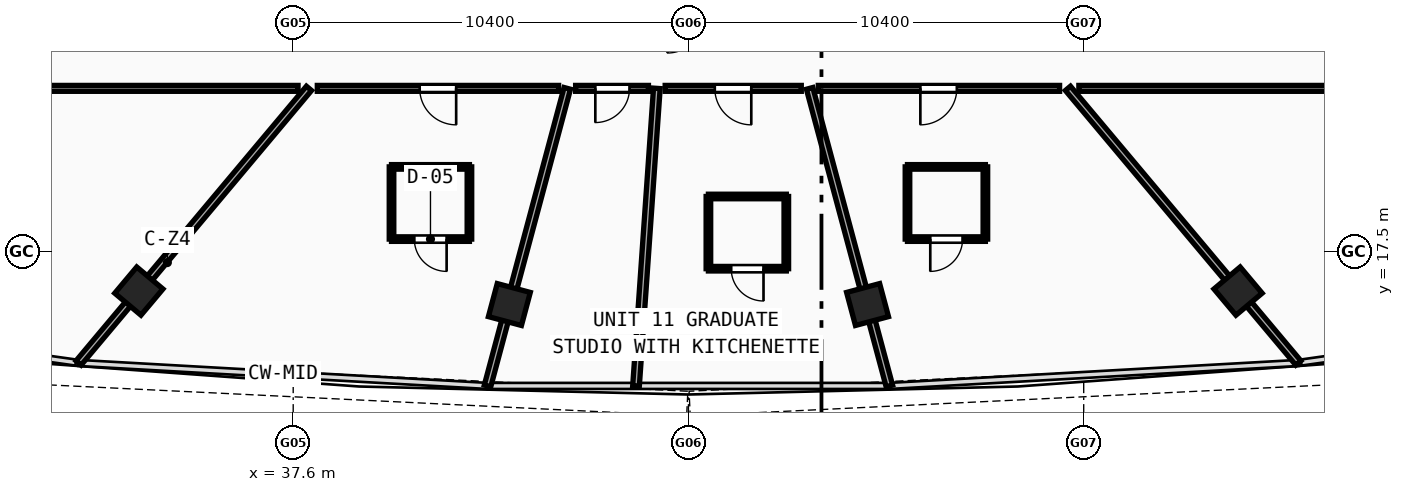
"""IFC4 building model, lengths in metres.
Left out: names, types, materials, properties, quantities, classifications, styles, units other than length and angle.
Written with IfcOpenShell. Run it as: python <this file> out.ifc"""

import sys

from ifc_helpers import new_model, si_unit, direction, frame, frame_2d, origin, origin_with_axes, origin_2d, place, context, subcontext, project, spatial, rectangle, hollow_rectangle, extrude, source, transform, mapped, element, fill, save


model = new_model("IFC4")
c1 = context("Model", 3, precision=1e-05, world=origin(), true_north=direction((0.0, 1.0)))
c2 = subcontext(c1, "Body", "Model", "MODEL_VIEW")
j1 = project(units=[si_unit("LENGTHUNIT", "METRE"), si_unit("PLANEANGLEUNIT", "RADIAN")], contexts=[c1])
p1 = place(None, origin())
s1 = spatial("IfcSite", under=j1, at=p1, CompositionType="ELEMENT")
p2 = place(p1, origin())
s2 = spatial("IfcBuilding", under=s1, at=p2, CompositionType="ELEMENT")
p3 = place(p2, frame((0.0, 0.0, 180.96)))
s3 = spatial("IfcBuildingStorey", under=s2, at=p3, CompositionType="ELEMENT", Elevation=180.96)
m1 = source(origin(), c2, "Body", "SweptSolid", [
    extrude(hollow_rectangle(XDim=0.9, YDim=0.9, WallThickness=0.036, at=origin_2d()), origin(), (0.0, 0.0, 1.0), 3.8),
])
for number, where, z_axis, x_axis in (
    (1, (33.539, 16.466, -0.26), (0.0, 0.0, 1.0), (0.766, -0.643, 0.0)),
    (2, (43.288, 16.112, -0.26), (0.0, 0.0, 1.0), (0.966, -0.259, 0.0)),
    (3, (52.713, 16.112, -0.26), (0.0, 0.0, 1.0), (0.966, 0.259, 0.0)),
    (4, (62.461, 16.466, -0.26), (0.0, 0.0, 1.0), (0.766, 0.643, 0.0)),
):
    element("IfcColumn", number, at=place(p3, frame(where, z_axis=z_axis, x_axis=x_axis)), inside=s3, PredefinedType="COLUMN", context=c2, shape_type="MappedRepresentation", body=[
        mapped(m1, transform((0.0, 0.0, 0.0), scale=1.0)),
    ])
p4 = place(p3, frame((38.015, 21.8, 0.0), z_axis=(0.0, 0.0, 1.0), x_axis=(-0.642777943688, -0.766052553751, 0.0)))
e5 = element("IfcWall", 5, at=p4, inside=s3, PredefinedType="PARTITIONING", context=c2, shape_type="SweptSolid", body=[
    extrude(rectangle(XDim=9.431, YDim=0.175, at=frame_2d((4.715, 0.0))), origin(), (0.0, 0.0, 1.0), 2.89),
])
p5 = place(p3, frame((44.811, 21.8, 0.0), z_axis=(0.0, 0.0, 1.0), x_axis=(-0.258815374981, -0.965926809688, 0.0)))
e6 = element("IfcWall", 6, at=p5, inside=s3, PredefinedType="PARTITIONING", context=c2, shape_type="SweptSolid", body=[
    extrude(rectangle(XDim=8.106, YDim=0.175, at=frame_2d((4.053, 0.0))), origin(), (0.0, 0.0, 1.0), 2.89),
])
p6 = place(p3, frame((47.168, 21.8, 0.0), z_axis=(0.0, 0.0, 1.0), x_axis=(-0.069770314737, -0.997563082307, 0.0)))
e7 = element("IfcWall", 7, at=p6, inside=s3, PredefinedType="PARTITIONING", context=c2, shape_type="SweptSolid", body=[
    extrude(rectangle(XDim=7.849, YDim=0.175, at=frame_2d((3.924, 0.0))), origin(), (0.0, 0.0, 1.0), 2.89),
])
p7 = place(p3, frame((51.189, 21.8, 0.0), z_axis=(0.0, 0.0, 1.0), x_axis=(0.258815374981, -0.965926809688, 0.0)))
e8 = element("IfcWall", 8, at=p7, inside=s3, PredefinedType="PARTITIONING", context=c2, shape_type="SweptSolid", body=[
    extrude(rectangle(XDim=8.106, YDim=0.175, at=frame_2d((4.053, 0.0))), origin(), (0.0, 0.0, 1.0), 2.89),
])
p8 = place(p3, frame((57.985, 21.8, 0.0), z_axis=(0.0, 0.0, 1.0), x_axis=(0.642777943688, -0.766052553751, 0.0)))
e9 = element("IfcWall", 9, at=p8, inside=s3, PredefinedType="PARTITIONING", context=c2, shape_type="SweptSolid", body=[
    extrude(rectangle(XDim=9.431, YDim=0.175, at=frame_2d((4.715, 0.0))), origin(), (0.0, 0.0, 1.0), 2.89),
])
p9 = place(p3, frame((66.4, 21.8, 0.0), z_axis=(0.0, 0.0, 1.0), x_axis=(-1.0, 0.0, 0.0)))
e10 = element("IfcWall", 10, at=p9, inside=s3, PredefinedType="PARTITIONING", context=c2, shape_type="SweptSolid", body=[
    extrude(rectangle(XDim=8.127, YDim=0.155, at=frame_2d((4.064, 0.0))), origin(), (0.0, 0.0, 1.0), 3.14),
])
p10 = place(p3, frame((57.765, 21.8, 0.0), z_axis=(0.0, 0.0, 1.0), x_axis=(-1.0, 0.0, 0.0)))
e11 = element("IfcWall", 11, at=p10, inside=s3, PredefinedType="PARTITIONING", context=c2, shape_type="SweptSolid", body=[
    extrude(rectangle(XDim=6.349, YDim=0.155, at=frame_2d((3.174, 0.0))), origin(), (0.0, 0.0, 1.0), 2.89),
])
p11 = place(p10, frame((2.703, 0.0, 0.0)))
e12 = element("IfcOpeningElement", 12, at=p11, cuts=e11, PredefinedType="OPENING", context=c2, shape_type="SweptSolid", body=[
    extrude(rectangle(XDim=0.96, YDim=2.12, at=frame_2d((0.48, 1.06))), frame((0.0, 0.087, 0.0), z_axis=(0.0, -1.0, 0.0), x_axis=(1.0, 0.0, 0.0)), (0.0, 0.0, 1.0), 0.175),
])
p12 = place(p3, frame((50.969, 21.8, 0.0), z_axis=(0.0, 0.0, 1.0), x_axis=(-1.0, 0.0, 0.0)))
e13 = element("IfcWall", 13, at=p12, inside=s3, PredefinedType="PARTITIONING", context=c2, shape_type="SweptSolid", body=[
    extrude(rectangle(XDim=3.581, YDim=0.155, at=frame_2d((1.791, 0.0))), origin(), (0.0, 0.0, 1.0), 3.54),
])
p13 = place(p12, frame((1.315, 0.0, 0.0)))
e14 = element("IfcOpeningElement", 14, at=p13, cuts=e13, PredefinedType="OPENING", context=c2, shape_type="SweptSolid", body=[
    extrude(rectangle(XDim=0.96, YDim=2.12, at=frame_2d((0.48, 1.06))), frame((0.0, 0.087, 0.0), z_axis=(0.0, -1.0, 0.0), x_axis=(1.0, 0.0, 0.0)), (0.0, 0.0, 1.0), 0.175),
])
p14 = place(p3, frame((46.948, 21.8, 0.0), z_axis=(0.0, 0.0, 1.0), x_axis=(-1.0, 0.0, 0.0)))
e15 = element("IfcWall", 15, at=p14, inside=s3, PredefinedType="PARTITIONING", context=c2, shape_type="SweptSolid", body=[
    extrude(rectangle(XDim=1.916, YDim=0.155, at=frame_2d((0.958, 0.0))), origin(), (0.0, 0.0, 1.0), 3.54),
])
p15 = place(p14, frame((0.498, 0.0, 0.0)))
e16 = element("IfcOpeningElement", 16, at=p15, cuts=e15, PredefinedType="OPENING", context=c2, shape_type="SweptSolid", body=[
    extrude(rectangle(XDim=0.9, YDim=2.08, at=frame_2d((0.45, 1.04))), frame((0.0, 0.087, 0.0), z_axis=(0.0, -1.0, 0.0), x_axis=(1.0, 0.0, 0.0)), (0.0, 0.0, 1.0), 0.175),
])
p16 = place(p3, frame((44.583, 21.8, 0.0), z_axis=(0.0, 0.0, 1.0), x_axis=(-1.0, 0.0, 0.0)))
e17 = element("IfcWall", 17, at=p16, inside=s3, PredefinedType="PARTITIONING", context=c2, shape_type="SweptSolid", body=[
    extrude(rectangle(XDim=6.349, YDim=0.155, at=frame_2d((3.174, 0.0))), origin(), (0.0, 0.0, 1.0), 2.89),
])
p17 = place(p16, frame((2.696, 0.0, 0.0)))
e18 = element("IfcOpeningElement", 18, at=p17, cuts=e17, PredefinedType="OPENING", context=c2, shape_type="SweptSolid", body=[
    extrude(rectangle(XDim=0.96, YDim=2.12, at=frame_2d((0.48, 1.06))), frame((0.0, 0.087, 0.0), z_axis=(0.0, -1.0, 0.0), x_axis=(1.0, 0.0, 0.0)), (0.0, 0.0, 1.0), 0.175),
])
p18 = place(p3, frame((37.728, 21.8, 0.0), z_axis=(0.0, 0.0, 1.0), x_axis=(-1.0, 0.0, 0.0)))
e19 = element("IfcWall", 19, at=p18, inside=s3, PredefinedType="PARTITIONING", context=c2, shape_type="SweptSolid", body=[
    extrude(rectangle(XDim=8.127, YDim=0.155, at=frame_2d((4.064, 0.0))), origin(), (0.0, 0.0, 1.0), 3.14),
])
p19 = place(p3, frame((40.187, 17.834, 0.0), z_axis=(0.0, 0.0, 1.0), x_axis=(1.0, 0.0, 0.0)))
e20 = element("IfcWall", 20, at=p19, inside=s3, PredefinedType="PARTITIONING", context=c2, shape_type="SweptSolid", body=[
    extrude(rectangle(XDim=2.05, YDim=0.12, at=frame_2d((1.025, 0.0))), origin(), (0.0, 0.0, 1.0), 3.54),
])
p20 = place(p19, frame((0.6, 0.0, 0.0)))
e21 = element("IfcOpeningElement", 21, at=p20, cuts=e20, PredefinedType="OPENING", context=c2, shape_type="SweptSolid", body=[
    extrude(rectangle(XDim=0.85, YDim=2.1, at=frame_2d((0.425, 1.05))), frame((0.0, 0.07, 0.0), z_axis=(0.0, -1.0, 0.0), x_axis=(1.0, 0.0, 0.0)), (0.0, 0.0, 1.0), 0.14),
])
p21 = place(p3, frame((42.237, 17.834, 0.0), z_axis=(0.0, 0.0, 1.0), x_axis=(0.0, 1.0, 0.0)))
e22 = element("IfcWall", 22, at=p21, inside=s3, PredefinedType="PARTITIONING", context=c2, shape_type="SweptSolid", body=[
    extrude(rectangle(XDim=1.9, YDim=0.12, at=frame_2d((0.95, 0.0))), origin(), (0.0, 0.0, 1.0), 3.14),
])
p22 = place(p3, frame((42.237, 19.734, 0.0), z_axis=(0.0, 0.0, 1.0), x_axis=(-1.0, 0.0, 0.0)))
e23 = element("IfcWall", 23, at=p22, inside=s3, PredefinedType="PARTITIONING", context=c2, shape_type="SweptSolid", body=[
    extrude(rectangle(XDim=2.05, YDim=0.12, at=frame_2d((1.025, 0.0))), origin(), (0.0, 0.0, 1.0), 3.14),
])
p23 = place(p3, frame((40.187, 19.734, 0.0), z_axis=(0.0, 0.0, 1.0), x_axis=(0.0, -1.0, 0.0)))
e24 = element("IfcWall", 24, at=p23, inside=s3, PredefinedType="PARTITIONING", context=c2, shape_type="SweptSolid", body=[
    extrude(rectangle(XDim=1.9, YDim=0.12, at=frame_2d((0.95, 0.0))), origin(), (0.0, 0.0, 1.0), 3.14),
])
p24 = place(p3, frame((48.525, 17.055, 0.0), z_axis=(0.0, 0.0, 1.0), x_axis=(1.0, 0.0, 0.0)))
e25 = element("IfcWall", 25, at=p24, inside=s3, PredefinedType="PARTITIONING", context=c2, shape_type="SweptSolid", body=[
    extrude(rectangle(XDim=2.05, YDim=0.12, at=frame_2d((1.025, 0.0))), origin(), (0.0, 0.0, 1.0), 3.54),
])
p25 = place(p24, frame((0.6, 0.0, 0.0)))
e26 = element("IfcOpeningElement", 26, at=p25, cuts=e25, PredefinedType="OPENING", context=c2, shape_type="SweptSolid", body=[
    extrude(rectangle(XDim=0.85, YDim=2.1, at=frame_2d((0.425, 1.05))), frame((0.0, 0.07, 0.0), z_axis=(0.0, -1.0, 0.0), x_axis=(1.0, 0.0, 0.0)), (0.0, 0.0, 1.0), 0.14),
])
p26 = place(p3, frame((50.575, 17.055, 0.0), z_axis=(0.0, 0.0, 1.0), x_axis=(0.0, 1.0, 0.0)))
e27 = element("IfcWall", 27, at=p26, inside=s3, PredefinedType="PARTITIONING", context=c2, shape_type="SweptSolid", body=[
    extrude(rectangle(XDim=1.9, YDim=0.12, at=frame_2d((0.95, 0.0))), origin(), (0.0, 0.0, 1.0), 3.54),
])
p27 = place(p3, frame((50.575, 18.955, 0.0), z_axis=(0.0, 0.0, 1.0), x_axis=(-1.0, 0.0, 0.0)))
e28 = element("IfcWall", 28, at=p27, inside=s3, PredefinedType="PARTITIONING", context=c2, shape_type="SweptSolid", body=[
    extrude(rectangle(XDim=2.05, YDim=0.12, at=frame_2d((1.025, 0.0))), origin(), (0.0, 0.0, 1.0), 3.54),
])
p28 = place(p3, frame((48.525, 18.955, 0.0), z_axis=(0.0, 0.0, 1.0), x_axis=(0.0, -1.0, 0.0)))
e29 = element("IfcWall", 29, at=p28, inside=s3, PredefinedType="PARTITIONING", context=c2, shape_type="SweptSolid", body=[
    extrude(rectangle(XDim=1.9, YDim=0.12, at=frame_2d((0.95, 0.0))), origin(), (0.0, 0.0, 1.0), 3.54),
])
p29 = place(p3, frame((53.763, 17.834, 0.0), z_axis=(0.0, 0.0, 1.0), x_axis=(1.0, 0.0, 0.0)))
e30 = element("IfcWall", 30, at=p29, inside=s3, PredefinedType="PARTITIONING", context=c2, shape_type="SweptSolid", body=[
    extrude(rectangle(XDim=2.05, YDim=0.12, at=frame_2d((1.025, 0.0))), origin(), (0.0, 0.0, 1.0), 3.54),
])
p30 = place(p29, frame((0.6, 0.0, 0.0)))
e31 = element("IfcOpeningElement", 31, at=p30, cuts=e30, PredefinedType="OPENING", context=c2, shape_type="SweptSolid", body=[
    extrude(rectangle(XDim=0.85, YDim=2.1, at=frame_2d((0.425, 1.05))), frame((0.0, 0.07, 0.0), z_axis=(0.0, -1.0, 0.0), x_axis=(1.0, 0.0, 0.0)), (0.0, 0.0, 1.0), 0.14),
])
p31 = place(p3, frame((55.813, 17.834, 0.0), z_axis=(0.0, 0.0, 1.0), x_axis=(0.0, 1.0, 0.0)))
e32 = element("IfcWall", 32, at=p31, inside=s3, PredefinedType="PARTITIONING", context=c2, shape_type="SweptSolid", body=[
    extrude(rectangle(XDim=1.9, YDim=0.12, at=frame_2d((0.95, 0.0))), origin(), (0.0, 0.0, 1.0), 3.14),
])
p32 = place(p3, frame((55.813, 19.734, 0.0), z_axis=(0.0, 0.0, 1.0), x_axis=(-1.0, 0.0, 0.0)))
e33 = element("IfcWall", 33, at=p32, inside=s3, PredefinedType="PARTITIONING", context=c2, shape_type="SweptSolid", body=[
    extrude(rectangle(XDim=2.05, YDim=0.12, at=frame_2d((1.025, 0.0))), origin(), (0.0, 0.0, 1.0), 3.14),
])
p33 = place(p3, frame((53.763, 19.734, 0.0), z_axis=(0.0, 0.0, 1.0), x_axis=(0.0, -1.0, 0.0)))
e34 = element("IfcWall", 34, at=p33, inside=s3, PredefinedType="PARTITIONING", context=c2, shape_type="SweptSolid", body=[
    extrude(rectangle(XDim=1.9, YDim=0.12, at=frame_2d((0.95, 0.0))), origin(), (0.0, 0.0, 1.0), 3.14),
])
m2 = source(origin(), c2, "Body", "SweptSolid", [
    extrude(rectangle(XDim=0.96, YDim=2.12, at=frame_2d((0.48, 1.06))), frame((0.0, 0.025, 0.0), z_axis=(0.0, -1.0, 0.0), x_axis=(1.0, 0.0, 0.0)), (0.0, 0.0, 1.0), 0.05),
])
p34 = place(p17, origin_with_axes())
e35 = element("IfcDoor", 35, at=p34, inside=s3, OperationType="SINGLE_SWING_LEFT", PredefinedType="DOOR", context=c2, shape_type="MappedRepresentation", body=[
    mapped(m2, transform((0.0, 0.0, 0.0), scale=1.0)),
])
fill(e18, e35)
m3 = source(origin(), c2, "Body", "SweptSolid", [
    extrude(rectangle(XDim=0.85, YDim=2.1, at=frame_2d((0.425, 1.05))), frame((0.0, 0.025, 0.0), z_axis=(0.0, -1.0, 0.0), x_axis=(1.0, 0.0, 0.0)), (0.0, 0.0, 1.0), 0.05),
])
p35 = place(p20, frame((0.85, 0.0, 0.0), z_axis=(0.0, 0.0, 1.0), x_axis=(-1.0, 0.0, 0.0)))
e36 = element("IfcDoor", 36, at=p35, inside=s3, OperationType="SINGLE_SWING_LEFT", PredefinedType="DOOR", context=c2, shape_type="MappedRepresentation", body=[
    mapped(m3, transform((0.0, 0.0, 0.0), scale=1.0)),
])
fill(e21, e36)
m4 = source(origin(), c2, "Body", "SweptSolid", [
    extrude(rectangle(XDim=0.9, YDim=2.08, at=frame_2d((0.45, 1.04))), frame((0.0, 0.025, 0.0), z_axis=(0.0, -1.0, 0.0), x_axis=(1.0, 0.0, 0.0)), (0.0, 0.0, 1.0), 0.05),
])
p36 = place(p15, origin_with_axes())
e37 = element("IfcDoor", 37, at=p36, inside=s3, OperationType="SINGLE_SWING_RIGHT", PredefinedType="DOOR", context=c2, shape_type="MappedRepresentation", body=[
    mapped(m4, transform((0.0, 0.0, 0.0), scale=1.0)),
])
fill(e16, e37)
p37 = place(p13, origin_with_axes())
e38 = element("IfcDoor", 38, at=p37, inside=s3, OperationType="SINGLE_SWING_LEFT", PredefinedType="DOOR", context=c2, shape_type="MappedRepresentation", body=[
    mapped(m2, transform((0.0, 0.0, 0.0), scale=1.0)),
])
fill(e14, e38)
p38 = place(p25, frame((0.85, 0.0, 0.0), z_axis=(0.0, 0.0, 1.0), x_axis=(-1.0, 0.0, 0.0)))
e39 = element("IfcDoor", 39, at=p38, inside=s3, OperationType="SINGLE_SWING_LEFT", PredefinedType="DOOR", context=c2, shape_type="MappedRepresentation", body=[
    mapped(m3, transform((0.0, 0.0, 0.0), scale=1.0)),
])
fill(e26, e39)
p39 = place(p11, origin_with_axes())
e40 = element("IfcDoor", 40, at=p39, inside=s3, OperationType="SINGLE_SWING_RIGHT", PredefinedType="DOOR", context=c2, shape_type="MappedRepresentation", body=[
    mapped(m2, transform((0.0, 0.0, 0.0), scale=1.0)),
])
fill(e12, e40)
p40 = place(p30, frame((0.85, 0.0, 0.0), z_axis=(0.0, 0.0, 1.0), x_axis=(-1.0, 0.0, 0.0)))
e41 = element("IfcDoor", 41, at=p40, inside=s3, OperationType="SINGLE_SWING_RIGHT", PredefinedType="DOOR", context=c2, shape_type="MappedRepresentation", body=[
    mapped(m3, transform((0.0, 0.0, 0.0), scale=1.0)),
])
fill(e31, e41)
save(model, sys.argv[1])
